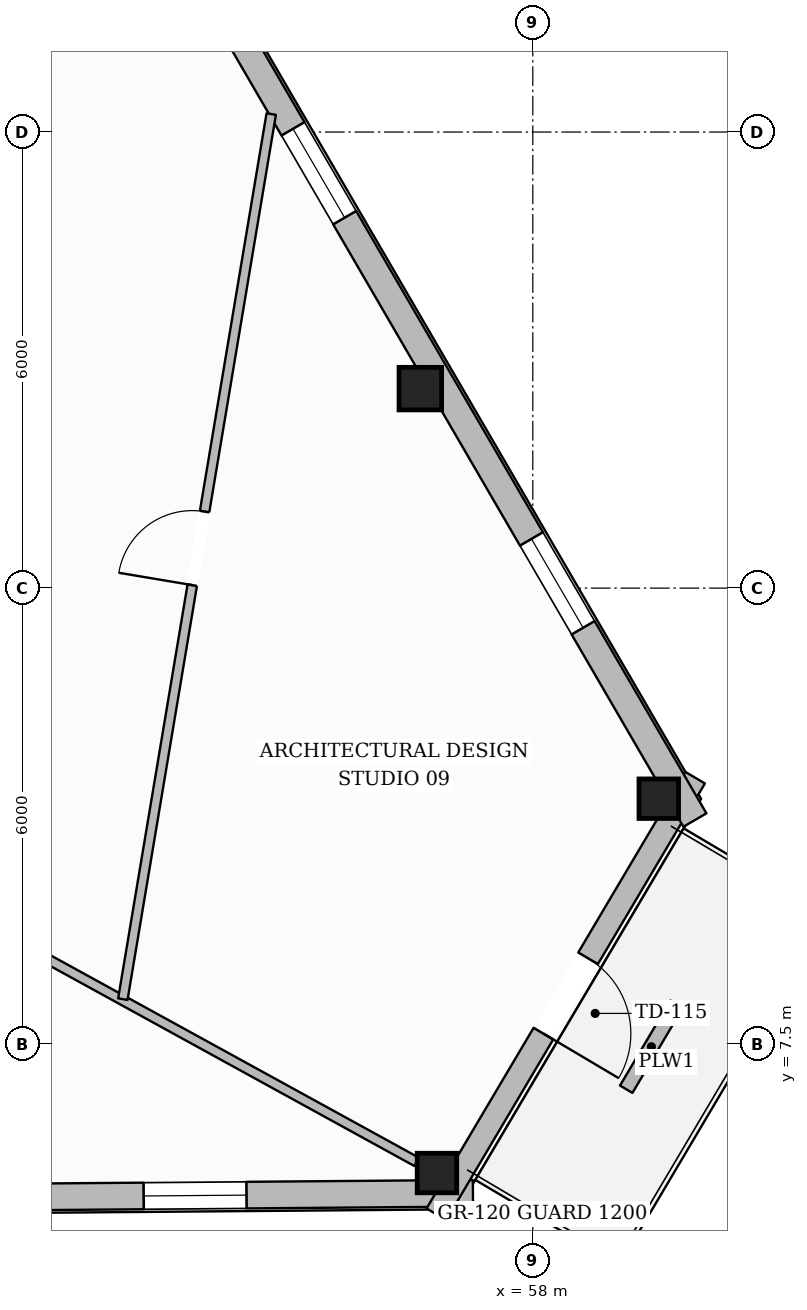
"""IFC4 building model, lengths in metres.
Left out: names, types, materials, properties, quantities, classifications, styles, units other than length and angle.
Written with IfcOpenShell. Run it as: python <this file> out.ifc"""

import sys

from ifc_helpers import new_model, si_unit, direction, frame, frame_2d, origin, origin_2d, place, context, subcontext, project, spatial, rectangle, hollow_rectangle, extrude, element, fill, save


model = new_model("IFC4")
c1 = context("Model", 3, precision=1e-05, world=origin(), true_north=direction((0.0, 1.0)))
c2 = subcontext(c1, "Body", "Model", "MODEL_VIEW")
j1 = project(units=[si_unit("LENGTHUNIT", "METRE"), si_unit("PLANEANGLEUNIT", "RADIAN")], contexts=[c1])
p1 = place(None, origin())
s1 = spatial("IfcSite", under=j1, at=p1, CompositionType="ELEMENT")
p2 = place(p1, origin())
s2 = spatial("IfcBuilding", under=s1, at=p2, CompositionType="ELEMENT")
p3 = place(p2, frame((0.0, 0.0, 281.85)))
s3 = spatial("IfcBuildingStorey", under=s2, at=p3, CompositionType="ELEMENT", Elevation=281.85)
for number, where, z_axis, x_axis in (
    (1, (56.739, 5.805, 0.0), (0.0, 0.0, 1.0), (1.0, 0.0, 0.0)),
    (2, (59.657, 10.729, 0.0), (0.0, 0.0, 1.0), (1.0, 0.0, 0.0)),
):
    element("IfcColumn", number, at=place(p3, frame(where, z_axis=z_axis, x_axis=x_axis)), inside=s3, PredefinedType="COLUMN", context=c2, shape_type="SweptSolid", body=[
        extrude(hollow_rectangle(XDim=0.52, YDim=0.52, WallThickness=0.024, at=origin_2d()), origin(), (0.0, 0.0, 1.0), 3.61),
    ])
p4 = place(p3, frame((56.52, 16.125, 0.0), z_axis=(0.0, 0.0, 1.0), x_axis=(1.0, 0.0, 0.0)))
e3 = element("IfcColumn", 3, at=p4, inside=s3, PredefinedType="COLUMN", context=c2, shape_type="SweptSolid", body=[
    extrude(hollow_rectangle(XDim=0.56, YDim=0.56, WallThickness=0.025, at=origin_2d()), origin(), (0.0, 0.0, 1.0), 3.61),
])
p5 = place(p3, frame((57.212, 5.539, 0.0), z_axis=(0.0, 0.0, 1.0), x_axis=(-0.999965837877, -0.008265777521, 0.0)))
e4 = element("IfcWall", 4, at=p5, inside=s3, PredefinedType="STANDARD", context=c2, shape_type="SweptSolid", body=[
    extrude(rectangle(XDim=39.165, YDim=0.35, at=frame_2d((19.583, 0.0))), origin(), (0.0, 0.0, 1.0), 3.196),
])
p6 = place(p5, frame((34.827, 0.0, 0.65)))
e5 = element("IfcOpeningElement", 5, at=p6, cuts=e4, PredefinedType="OPENING", context=c2, shape_type="SweptSolid", body=[
    extrude(rectangle(XDim=1.35, YDim=1.75, at=frame_2d((0.675, 0.875))), frame((0.0, 0.185, 0.0), z_axis=(0.0, -1.0, 0.0), x_axis=(1.0, 0.0, 0.0)), (0.0, 0.0, 1.0), 0.37),
])
p7 = place(p5, frame((28.458, 0.0, 0.65)))
e6 = element("IfcOpeningElement", 6, at=p7, cuts=e4, PredefinedType="OPENING", context=c2, shape_type="SweptSolid", body=[
    extrude(rectangle(XDim=1.35, YDim=1.75, at=frame_2d((0.675, 0.875))), frame((0.0, 0.185, 0.0), z_axis=(0.0, -1.0, 0.0), x_axis=(1.0, 0.0, 0.0)), (0.0, 0.0, 1.0), 0.37),
])
p8 = place(p5, frame((15.719, 0.0, 0.65)))
e7 = element("IfcOpeningElement", 7, at=p8, cuts=e4, PredefinedType="OPENING", context=c2, shape_type="SweptSolid", body=[
    extrude(rectangle(XDim=1.35, YDim=1.75, at=frame_2d((0.675, 0.875))), frame((0.0, 0.185, 0.0), z_axis=(0.0, -1.0, 0.0), x_axis=(1.0, 0.0, 0.0)), (0.0, 0.0, 1.0), 0.37),
])
p9 = place(p5, frame((9.35, 0.0, 0.65)))
e8 = element("IfcOpeningElement", 8, at=p9, cuts=e4, PredefinedType="OPENING", context=c2, shape_type="SweptSolid", body=[
    extrude(rectangle(XDim=1.35, YDim=1.75, at=frame_2d((0.675, 0.875))), frame((0.0, 0.185, 0.0), z_axis=(0.0, -1.0, 0.0), x_axis=(1.0, 0.0, 0.0)), (0.0, 0.0, 1.0), 0.37),
])
p10 = place(p5, frame((2.98, 0.0, 0.65)))
e9 = element("IfcOpeningElement", 9, at=p10, cuts=e4, PredefinedType="OPENING", context=c2, shape_type="SweptSolid", body=[
    extrude(rectangle(XDim=1.35, YDim=1.75, at=frame_2d((0.675, 0.875))), frame((0.0, 0.185, 0.0), z_axis=(0.0, -1.0, 0.0), x_axis=(1.0, 0.0, 0.0)), (0.0, 0.0, 1.0), 0.37),
])
p11 = place(p3, frame((60.135, 11.006, 0.0), z_axis=(0.0, 0.0, 1.0), x_axis=(-0.509788358207, -0.860299848795, 0.0)))
e10 = element("IfcWall", 10, at=p11, inside=s3, PredefinedType="STANDARD", context=c2, shape_type="SweptSolid", body=[
    extrude(rectangle(XDim=6.677, YDim=0.3, at=frame_2d((3.338, 0.0))), origin(), (0.0, 0.0, 1.0), 3.196),
])
p12 = place(p11, frame((2.763, 0.0, 0.0)))
e11 = element("IfcOpeningElement", 11, at=p12, cuts=e10, PredefinedType="OPENING", context=c2, shape_type="SweptSolid", body=[
    extrude(rectangle(XDim=1.15, YDim=2.2, at=frame_2d((0.575, 1.1))), frame((0.0, 0.16, 0.0), z_axis=(0.0, -1.0, 0.0), x_axis=(1.0, 0.0, 0.0)), (0.0, 0.0, 1.0), 0.32),
])
p13 = place(p3, frame((40.827, 43.65, 0.0), z_axis=(0.0, 0.0, 1.0), x_axis=(0.502670175865, -0.864478278672, 0.0)))
e12 = element("IfcWall", 12, at=p13, inside=s3, PredefinedType="STANDARD", context=c2, shape_type="SweptSolid", body=[
    extrude(rectangle(XDim=38.406, YDim=0.35, at=frame_2d((19.203, 0.0))), origin(), (0.0, 0.0, 1.0), 3.196),
])
p14 = place(p13, frame((34.128, 0.0, 0.65)))
e13 = element("IfcOpeningElement", 13, at=p14, cuts=e12, PredefinedType="OPENING", context=c2, shape_type="SweptSolid", body=[
    extrude(rectangle(XDim=1.35, YDim=1.75, at=frame_2d((0.675, 0.875))), frame((0.0, 0.185, 0.0), z_axis=(0.0, -1.0, 0.0), x_axis=(1.0, 0.0, 0.0)), (0.0, 0.0, 1.0), 0.37),
])
p15 = place(p13, frame((27.888, 0.0, 0.65)))
e14 = element("IfcOpeningElement", 14, at=p15, cuts=e12, PredefinedType="OPENING", context=c2, shape_type="SweptSolid", body=[
    extrude(rectangle(XDim=1.35, YDim=1.75, at=frame_2d((0.675, 0.875))), frame((0.0, 0.185, 0.0), z_axis=(0.0, -1.0, 0.0), x_axis=(1.0, 0.0, 0.0)), (0.0, 0.0, 1.0), 0.37),
])
p16 = place(p13, frame((15.406, 0.0, 0.65)))
e15 = element("IfcOpeningElement", 15, at=p16, cuts=e12, PredefinedType="OPENING", context=c2, shape_type="SweptSolid", body=[
    extrude(rectangle(XDim=1.35, YDim=1.75, at=frame_2d((0.675, 0.875))), frame((0.0, 0.185, 0.0), z_axis=(0.0, -1.0, 0.0), x_axis=(1.0, 0.0, 0.0)), (0.0, 0.0, 1.0), 0.37),
])
p17 = place(p13, frame((9.165, 0.0, 0.65)))
e16 = element("IfcOpeningElement", 16, at=p17, cuts=e12, PredefinedType="OPENING", context=c2, shape_type="SweptSolid", body=[
    extrude(rectangle(XDim=1.35, YDim=1.75, at=frame_2d((0.675, 0.875))), frame((0.0, 0.185, 0.0), z_axis=(0.0, -1.0, 0.0), x_axis=(1.0, 0.0, 0.0)), (0.0, 0.0, 1.0), 0.37),
])
p18 = place(p13, frame((2.924, 0.0, 0.65)))
e17 = element("IfcOpeningElement", 17, at=p18, cuts=e12, PredefinedType="OPENING", context=c2, shape_type="SweptSolid", body=[
    extrude(rectangle(XDim=1.35, YDim=1.75, at=frame_2d((0.675, 0.875))), frame((0.0, 0.185, 0.0), z_axis=(0.0, -1.0, 0.0), x_axis=(1.0, 0.0, 0.0)), (0.0, 0.0, 1.0), 0.37),
])
p19 = place(p3, frame((59.229, 6.907, 0.0), z_axis=(0.0, 0.0, 1.0), x_axis=(0.509709722903, 0.860346440905, 0.0)))
e18 = element("IfcWall", 18, at=p19, inside=s3, PredefinedType="USERDEFINED", context=c2, shape_type="SweptSolid", body=[
    extrude(rectangle(XDim=1.3, YDim=0.19, at=frame_2d((0.65, 0.0))), origin(), (0.0, 0.0, 1.0), 0.52),
])
p20 = place(p3, frame((49.99, 20.324, 0.0), z_axis=(0.0, 0.0, 1.0), x_axis=(0.943184604902, 0.332269169613, 0.0)))
e19 = element("IfcWall", 19, at=p20, inside=s3, PredefinedType="PARTITIONING", context=c2, shape_type="SweptSolid", body=[
    extrude(rectangle(XDim=3.292, YDim=0.125, at=frame_2d((1.646, 0.0))), origin(), (0.0, 0.0, 1.0), 3.61),
])
p21 = place(p3, frame((49.99, 9.513, 0.0), z_axis=(0.0, 0.0, 1.0), x_axis=(0.876449336432, -0.481494092039, 0.0)))
e20 = element("IfcWall", 20, at=p21, inside=s3, PredefinedType="PARTITIONING", context=c2, shape_type="SweptSolid", body=[
    extrude(rectangle(XDim=7.394, YDim=0.125, at=frame_2d((3.697, 0.0))), origin(), (0.0, 0.0, 1.0), 3.246),
])
p22 = place(p3, frame((52.606, 8.093, 0.0), z_axis=(0.0, 0.0, 1.0), x_axis=(0.165341157719, 0.986236432892, 0.0)))
e21 = element("IfcWall", 21, at=p22, inside=s3, PredefinedType="PARTITIONING", context=c2, shape_type="SweptSolid", body=[
    extrude(rectangle(XDim=11.807, YDim=0.125, at=frame_2d((5.903, 0.0))), origin(), (0.0, 0.0, 1.0), 3.349),
])
p23 = place(p22, frame((5.523, 0.0, 0.0)))
e22 = element("IfcOpeningElement", 22, at=p23, cuts=e21, PredefinedType="OPENING", context=c2, shape_type="SweptSolid", body=[
    extrude(rectangle(XDim=0.98, YDim=2.15, at=frame_2d((0.49, 1.075))), frame((0.0, 0.073, 0.0), z_axis=(0.0, -1.0, 0.0), x_axis=(1.0, 0.0, 0.0)), (0.0, 0.0, 1.0), 0.145),
])
p24 = place(p12, origin())
e23 = element("IfcDoor", 23, at=p24, inside=s3, OperationType="SINGLE_SWING_RIGHT", PredefinedType="DOOR", context=c2, shape_type="SweptSolid", body=[
    extrude(rectangle(XDim=1.15, YDim=2.2, at=frame_2d((0.575, 1.1))), frame((0.0, 0.025, 0.0), z_axis=(0.0, -1.0, 0.0), x_axis=(1.0, 0.0, 0.0)), (0.0, 0.0, 1.0), 0.05),
])
fill(e11, e23)
p25 = place(p10, origin())
e24 = element("IfcWindow", 24, at=p25, inside=s3, PartitioningType="SINGLE_PANEL", PredefinedType="WINDOW", context=c2, shape_type="SweptSolid", body=[
    extrude(rectangle(XDim=1.35, YDim=1.75, at=frame_2d((0.675, 0.875))), frame((0.0, 0.03, 0.0), z_axis=(0.0, -1.0, 0.0), x_axis=(1.0, 0.0, 0.0)), (0.0, 0.0, 1.0), 0.06),
])
fill(e9, e24)
p26 = place(p14, origin())
e25 = element("IfcWindow", 25, at=p26, inside=s3, PartitioningType="SINGLE_PANEL", PredefinedType="WINDOW", context=c2, shape_type="SweptSolid", body=[
    extrude(rectangle(XDim=1.35, YDim=1.75, at=frame_2d((0.675, 0.875))), frame((0.0, 0.03, 0.0), z_axis=(0.0, -1.0, 0.0), x_axis=(1.0, 0.0, 0.0)), (0.0, 0.0, 1.0), 0.06),
])
fill(e13, e25)
p27 = place(p15, origin())
e26 = element("IfcWindow", 26, at=p27, inside=s3, PartitioningType="SINGLE_PANEL", PredefinedType="WINDOW", context=c2, shape_type="SweptSolid", body=[
    extrude(rectangle(XDim=1.35, YDim=1.75, at=frame_2d((0.675, 0.875))), frame((0.0, 0.03, 0.0), z_axis=(0.0, -1.0, 0.0), x_axis=(1.0, 0.0, 0.0)), (0.0, 0.0, 1.0), 0.06),
])
fill(e14, e26)
p28 = place(p23, origin())
e27 = element("IfcDoor", 27, at=p28, inside=s3, OperationType="SINGLE_SWING_LEFT", PredefinedType="DOOR", context=c2, shape_type="SweptSolid", body=[
    extrude(rectangle(XDim=0.98, YDim=2.15, at=frame_2d((0.49, 1.075))), frame((0.0, 0.025, 0.0), z_axis=(0.0, -1.0, 0.0), x_axis=(1.0, 0.0, 0.0)), (0.0, 0.0, 1.0), 0.05),
])
fill(e22, e27)
save(model, sys.argv[1])
